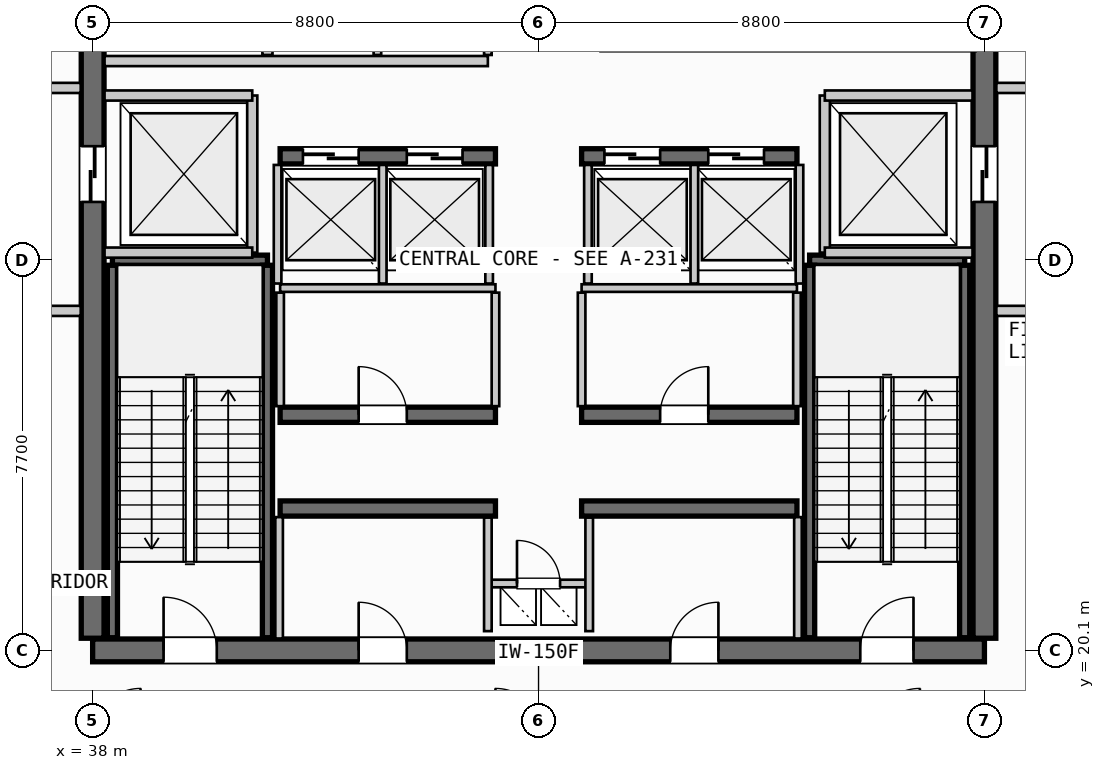
"""IFC4 building model, lengths in metres.
Left out: names, types, materials, properties, quantities, classifications, styles, units other than length and angle.
Written with IfcOpenShell. Run it as: python <this file> out.ifc"""

import sys

from ifc_helpers import new_model, si_unit, direction, frame, frame_2d, origin, place, context, subcontext, project, spatial, rectangle, extrude, source, transform, mapped, element, fill, save


model = new_model("IFC4")
c1 = context("Model", 3, precision=1e-05, world=origin(), true_north=direction((0.0, 1.0)))
c2 = subcontext(c1, "Body", "Model", "MODEL_VIEW")
j1 = project(units=[si_unit("LENGTHUNIT", "METRE"), si_unit("PLANEANGLEUNIT", "RADIAN")], contexts=[c1])
p1 = place(None, origin())
s1 = spatial("IfcSite", under=j1, at=p1, CompositionType="ELEMENT")
p2 = place(p1, origin())
s2 = spatial("IfcBuilding", under=s1, at=p2, CompositionType="ELEMENT")
p3 = place(p2, frame((0.0, 0.0, 223.6)))
s3 = spatial("IfcBuildingStorey", under=s2, at=p3, CompositionType="ELEMENT", Elevation=223.6)
p4 = place(p3, frame((38.0, 20.1, 0.0), z_axis=(0.0, 0.0, 1.0), x_axis=(1.0, 0.0, 0.0)))
e1 = element("IfcWall", 1, at=p4, inside=s3, PredefinedType="SHEAR", context=c2, shape_type="SweptSolid", body=[
    extrude(rectangle(XDim=17.6, YDim=0.45, at=frame_2d((8.8, 0.0))), origin(), (0.0, 0.0, 1.0), 4.38),
])
p5 = place(p4, frame((1.4, 0.0, 0.0)))
e2 = element("IfcOpeningElement", 2, at=p5, cuts=e1, PredefinedType="OPENING", context=c2, shape_type="SweptSolid", body=[
    extrude(rectangle(XDim=1.05, YDim=2.15, at=frame_2d((0.525, 1.075))), frame((0.0, 0.235, 0.0), z_axis=(0.0, -1.0, 0.0), x_axis=(1.0, 0.0, 0.0)), (0.0, 0.0, 1.0), 0.47),
])
p6 = place(p4, frame((15.15, 0.0, 0.0)))
e3 = element("IfcOpeningElement", 3, at=p6, cuts=e1, PredefinedType="OPENING", context=c2, shape_type="SweptSolid", body=[
    extrude(rectangle(XDim=1.05, YDim=2.15, at=frame_2d((0.525, 1.075))), frame((0.0, 0.235, 0.0), z_axis=(0.0, -1.0, 0.0), x_axis=(1.0, 0.0, 0.0)), (0.0, 0.0, 1.0), 0.47),
])
p7 = place(p4, frame((5.25, 0.0, 0.0)))
e4 = element("IfcOpeningElement", 4, at=p7, cuts=e1, PredefinedType="OPENING", context=c2, shape_type="SweptSolid", body=[
    extrude(rectangle(XDim=0.95, YDim=2.15, at=frame_2d((0.475, 1.075))), frame((0.0, 0.235, 0.0), z_axis=(0.0, -1.0, 0.0), x_axis=(1.0, 0.0, 0.0)), (0.0, 0.0, 1.0), 0.47),
])
p8 = place(p4, frame((11.4, 0.0, 0.0)))
e5 = element("IfcOpeningElement", 5, at=p8, cuts=e1, PredefinedType="OPENING", context=c2, shape_type="SweptSolid", body=[
    extrude(rectangle(XDim=0.95, YDim=2.15, at=frame_2d((0.475, 1.075))), frame((0.0, 0.235, 0.0), z_axis=(0.0, -1.0, 0.0), x_axis=(1.0, 0.0, 0.0)), (0.0, 0.0, 1.0), 0.47),
])
p9 = place(p3, frame((38.0, 35.26, 0.0), z_axis=(0.0, 0.0, 1.0), x_axis=(0.0, -1.0, 0.0)))
e6 = element("IfcWall", 6, at=p9, inside=s3, PredefinedType="SHEAR", context=c2, shape_type="SweptSolid", body=[
    extrude(rectangle(XDim=14.92, YDim=0.45, at=frame_2d((7.46, 0.0))), origin(), (0.0, 0.0, 1.0), 4.38),
])
p10 = place(p9, frame((5.21, 0.0, 0.0)))
e7 = element("IfcOpeningElement", 7, at=p10, cuts=e6, PredefinedType="OPENING", context=c2, shape_type="SweptSolid", body=[
    extrude(rectangle(XDim=1.1, YDim=2.2, at=frame_2d((0.55, 1.1))), frame((0.0, 0.235, 0.0), z_axis=(0.0, -1.0, 0.0), x_axis=(1.0, 0.0, 0.0)), (0.0, 0.0, 1.0), 0.47),
])
p11 = place(p3, frame((55.6, 20.34, 0.0), z_axis=(0.0, 0.0, 1.0), x_axis=(0.0, 1.0, 0.0)))
e8 = element("IfcWall", 8, at=p11, inside=s3, PredefinedType="SHEAR", context=c2, shape_type="SweptSolid", body=[
    extrude(rectangle(XDim=14.92, YDim=0.45, at=frame_2d((7.46, 0.0))), origin(), (0.0, 0.0, 1.0), 4.38),
])
p12 = place(p11, frame((12.71, 0.0, 0.0)))
e9 = element("IfcOpeningElement", 9, at=p12, cuts=e8, PredefinedType="OPENING", context=c2, shape_type="SweptSolid", body=[
    extrude(rectangle(XDim=1.05, YDim=2.15, at=frame_2d((0.525, 1.075))), frame((0.0, 0.235, 0.0), z_axis=(0.0, -1.0, 0.0), x_axis=(1.0, 0.0, 0.0)), (0.0, 0.0, 1.0), 0.47),
])
p13 = place(p11, frame((8.61, 0.0, 0.0)))
e10 = element("IfcOpeningElement", 10, at=p13, cuts=e8, PredefinedType="OPENING", context=c2, shape_type="SweptSolid", body=[
    extrude(rectangle(XDim=1.1, YDim=2.2, at=frame_2d((0.55, 1.1))), frame((0.0, 0.235, 0.0), z_axis=(0.0, -1.0, 0.0), x_axis=(1.0, 0.0, 0.0)), (0.0, 0.0, 1.0), 0.47),
])
for number, where, z_axis, x_axis in (
    (11, (41.7, 22.9, 0.0), (0.0, 0.0, 1.0), (1.0, 0.0, 0.0)),
    (12, (47.65, 22.9, 0.0), (0.0, 0.0, 1.0), (1.0, 0.0, 0.0)),
):
    element("IfcWall", number, at=place(p3, frame(where, z_axis=z_axis, x_axis=x_axis)), inside=s3, PredefinedType="SHEAR", context=c2, shape_type="SweptSolid", body=[
        extrude(rectangle(XDim=4.25, YDim=0.3, at=frame_2d((2.125, 0.0))), origin(), (0.0, 0.0, 1.0), 4.38),
    ])
p14 = place(p3, frame((41.7, 24.75, 0.0), z_axis=(0.0, 0.0, 1.0), x_axis=(1.0, 0.0, 0.0)))
e13 = element("IfcWall", 13, at=p14, inside=s3, PredefinedType="SHEAR", context=c2, shape_type="SweptSolid", body=[
    extrude(rectangle(XDim=4.25, YDim=0.3, at=frame_2d((2.125, 0.0))), origin(), (0.0, 0.0, 1.0), 4.38),
])
p15 = place(p14, frame((1.55, 0.0, 0.0)))
e14 = element("IfcOpeningElement", 14, at=p15, cuts=e13, PredefinedType="OPENING", context=c2, shape_type="SweptSolid", body=[
    extrude(rectangle(XDim=0.95, YDim=2.15, at=frame_2d((0.475, 1.075))), frame((0.0, 0.16, 0.0), z_axis=(0.0, -1.0, 0.0), x_axis=(1.0, 0.0, 0.0)), (0.0, 0.0, 1.0), 0.32),
])
p16 = place(p3, frame((47.65, 24.75, 0.0), z_axis=(0.0, 0.0, 1.0), x_axis=(1.0, 0.0, 0.0)))
e15 = element("IfcWall", 15, at=p16, inside=s3, PredefinedType="SHEAR", context=c2, shape_type="SweptSolid", body=[
    extrude(rectangle(XDim=4.25, YDim=0.3, at=frame_2d((2.125, 0.0))), origin(), (0.0, 0.0, 1.0), 4.38),
])
p17 = place(p16, frame((1.55, 0.0, 0.0)))
e16 = element("IfcOpeningElement", 16, at=p17, cuts=e15, PredefinedType="OPENING", context=c2, shape_type="SweptSolid", body=[
    extrude(rectangle(XDim=0.95, YDim=2.15, at=frame_2d((0.475, 1.075))), frame((0.0, 0.16, 0.0), z_axis=(0.0, -1.0, 0.0), x_axis=(1.0, 0.0, 0.0)), (0.0, 0.0, 1.0), 0.32),
])
p18 = place(p3, frame((41.7, 29.85, 0.0), z_axis=(0.0, 0.0, 1.0), x_axis=(1.0, 0.0, 0.0)))
e17 = element("IfcWall", 17, at=p18, inside=s3, PredefinedType="SHEAR", context=c2, shape_type="SweptSolid", body=[
    extrude(rectangle(XDim=4.25, YDim=0.3, at=frame_2d((2.125, 0.0))), origin(), (0.0, 0.0, 1.0), 4.38),
])
p19 = place(p18, frame((0.45, 0.0, 0.0)))
e18 = element("IfcOpeningElement", 18, at=p19, cuts=e17, PredefinedType="OPENING", context=c2, shape_type="SweptSolid", body=[
    extrude(rectangle(XDim=1.1, YDim=2.2, at=frame_2d((0.55, 1.1))), frame((0.0, 0.16, 0.0), z_axis=(0.0, -1.0, 0.0), x_axis=(1.0, 0.0, 0.0)), (0.0, 0.0, 1.0), 0.32),
])
p20 = place(p18, frame((2.5, 0.0, 0.0)))
e19 = element("IfcOpeningElement", 19, at=p20, cuts=e17, PredefinedType="OPENING", context=c2, shape_type="SweptSolid", body=[
    extrude(rectangle(XDim=1.1, YDim=2.2, at=frame_2d((0.55, 1.1))), frame((0.0, 0.16, 0.0), z_axis=(0.0, -1.0, 0.0), x_axis=(1.0, 0.0, 0.0)), (0.0, 0.0, 1.0), 0.32),
])
p21 = place(p3, frame((47.65, 29.85, 0.0), z_axis=(0.0, 0.0, 1.0), x_axis=(1.0, 0.0, 0.0)))
e20 = element("IfcWall", 20, at=p21, inside=s3, PredefinedType="SHEAR", context=c2, shape_type="SweptSolid", body=[
    extrude(rectangle(XDim=4.25, YDim=0.3, at=frame_2d((2.125, 0.0))), origin(), (0.0, 0.0, 1.0), 4.38),
])
p22 = place(p21, frame((0.45, 0.0, 0.0)))
e21 = element("IfcOpeningElement", 21, at=p22, cuts=e20, PredefinedType="OPENING", context=c2, shape_type="SweptSolid", body=[
    extrude(rectangle(XDim=1.1, YDim=2.2, at=frame_2d((0.55, 1.1))), frame((0.0, 0.16, 0.0), z_axis=(0.0, -1.0, 0.0), x_axis=(1.0, 0.0, 0.0)), (0.0, 0.0, 1.0), 0.32),
])
p23 = place(p21, frame((2.5, 0.0, 0.0)))
e22 = element("IfcOpeningElement", 22, at=p23, cuts=e20, PredefinedType="OPENING", context=c2, shape_type="SweptSolid", body=[
    extrude(rectangle(XDim=1.1, YDim=2.2, at=frame_2d((0.55, 1.1))), frame((0.0, 0.16, 0.0), z_axis=(0.0, -1.0, 0.0), x_axis=(1.0, 0.0, 0.0)), (0.0, 0.0, 1.0), 0.32),
])
p24 = place(p3, frame((38.39, 27.8, 0.0), z_axis=(0.0, 0.0, 1.0), x_axis=(1.0, 0.0, 0.0)))
e23 = element("IfcWall", 23, at=p24, inside=s3, PredefinedType="SHEAR", context=c2, shape_type="SweptSolid", body=[
    extrude(rectangle(XDim=3.06, YDim=0.2, at=frame_2d((1.53, 0.0))), origin(), (0.0, 0.0, 1.0), 4.38),
])
for number, where, z_axis, x_axis in (
    (24, (41.45, 27.7, 0.0), (0.0, 0.0, 1.0), (0.0, -1.0, 0.0)),
    (25, (38.39, 20.35, 0.0), (0.0, 0.0, 1.0), (0.0, 1.0, 0.0)),
):
    element("IfcWall", number, at=place(p3, frame(where, z_axis=z_axis, x_axis=x_axis)), inside=s3, PredefinedType="SHEAR", context=c2, shape_type="SweptSolid", body=[
        extrude(rectangle(XDim=7.35, YDim=0.2, at=frame_2d((3.675, 0.0))), origin(), (0.0, 0.0, 1.0), 4.38),
    ])
p25 = place(p3, frame((52.15, 27.8, 0.0), z_axis=(0.0, 0.0, 1.0), x_axis=(1.0, 0.0, 0.0)))
e26 = element("IfcWall", 26, at=p25, inside=s3, PredefinedType="SHEAR", context=c2, shape_type="SweptSolid", body=[
    extrude(rectangle(XDim=3.06, YDim=0.2, at=frame_2d((1.53, 0.0))), origin(), (0.0, 0.0, 1.0), 4.38),
])
for number, where, z_axis, x_axis in (
    (27, (55.21, 27.7, 0.0), (0.0, 0.0, 1.0), (0.0, -1.0, 0.0)),
    (28, (52.15, 20.35, 0.0), (0.0, 0.0, 1.0), (0.0, 1.0, 0.0)),
):
    element("IfcWall", number, at=place(p3, frame(where, z_axis=z_axis, x_axis=x_axis)), inside=s3, PredefinedType="SHEAR", context=c2, shape_type="SweptSolid", body=[
        extrude(rectangle(XDim=7.35, YDim=0.2, at=frame_2d((3.675, 0.0))), origin(), (0.0, 0.0, 1.0), 4.38),
    ])
p26 = place(p3, frame((45.8, 21.42, 0.0), z_axis=(0.0, 0.0, 1.0), x_axis=(1.0, 0.0, 0.0)))
e29 = element("IfcWall", 29, at=p26, inside=s3, PredefinedType="PARTITIONING", context=c2, shape_type="SweptSolid", body=[
    extrude(rectangle(XDim=2.0, YDim=0.15, at=frame_2d((1.0, 0.0))), origin(), (0.0, 0.0, 1.0), 2.455),
])
p27 = place(p26, frame((0.575, 0.0, 0.0)))
e30 = element("IfcOpeningElement", 30, at=p27, cuts=e29, PredefinedType="OPENING", context=c2, shape_type="SweptSolid", body=[
    extrude(rectangle(XDim=0.85, YDim=2.15, at=frame_2d((0.425, 1.075))), frame((0.0, 0.085, 0.0), z_axis=(0.0, -1.0, 0.0), x_axis=(1.0, 0.0, 0.0)), (0.0, 0.0, 1.0), 0.17),
])
for number, where, z_axis, x_axis in (
    (31, (45.8, 20.48, 0.0), (0.0, 0.0, 1.0), (0.0, 1.0, 0.0)),
    (32, (47.8, 20.48, 0.0), (0.0, 0.0, 1.0), (0.0, 1.0, 0.0)),
):
    element("IfcWall", number, at=place(p3, frame(where, z_axis=z_axis, x_axis=x_axis)), inside=s3, PredefinedType="PARTITIONING", context=c2, shape_type="SweptSolid", body=[
        extrude(rectangle(XDim=2.24, YDim=0.15, at=frame_2d((1.12, 0.0))), origin(), (0.0, 0.0, 1.0), 2.455),
    ])
p28 = place(p3, frame((41.15, 27.95, 0.0), z_axis=(0.0, 0.0, 1.0), x_axis=(0.0, 1.0, 0.0)))
e33 = element("IfcWall", 33, at=p28, inside=s3, PredefinedType="PARTITIONING", context=c2, shape_type="SweptSolid", body=[
    extrude(rectangle(XDim=3.1, YDim=0.2, at=frame_2d((1.55, 0.0))), origin(), (0.0, 0.0, 1.0), 2.455),
])
for number, where, z_axis, x_axis in (
    (34, (38.235, 27.95, 0.0), (0.0, 0.0, 1.0), (1.0, 0.0, 0.0)),
    (35, (38.235, 31.05, 0.0), (0.0, 0.0, 1.0), (1.0, 0.0, 0.0)),
):
    element("IfcWall", number, at=place(p3, frame(where, z_axis=z_axis, x_axis=x_axis)), inside=s3, PredefinedType="PARTITIONING", context=c2, shape_type="SweptSolid", body=[
        extrude(rectangle(XDim=2.915, YDim=0.2, at=frame_2d((1.458, 0.0))), origin(), (0.0, 0.0, 1.0), 2.455),
    ])
for number, where, z_axis, x_axis in (
    (36, (34.5, 26.8, 0.0), (0.0, 0.0, 1.0), (1.0, 0.0, 0.0)),
    (37, (34.5, 31.2, 0.0), (0.0, 0.0, 1.0), (1.0, 0.0, 0.0)),
):
    element("IfcWall", number, at=place(p3, frame(where, z_axis=z_axis, x_axis=x_axis)), inside=s3, PredefinedType="PARTITIONING", context=c2, shape_type="SweptSolid", body=[
        extrude(rectangle(XDim=3.265, YDim=0.2, at=frame_2d((1.632, 0.0))), origin(), (0.0, 0.0, 1.0), 2.455),
    ])
p29 = place(p3, frame((52.45, 27.95, 0.0), z_axis=(0.0, 0.0, 1.0), x_axis=(0.0, 1.0, 0.0)))
e38 = element("IfcWall", 38, at=p29, inside=s3, PredefinedType="PARTITIONING", context=c2, shape_type="SweptSolid", body=[
    extrude(rectangle(XDim=3.1, YDim=0.2, at=frame_2d((1.55, 0.0))), origin(), (0.0, 0.0, 1.0), 2.455),
])
for number, where, z_axis, x_axis in (
    (39, (52.45, 27.95, 0.0), (0.0, 0.0, 1.0), (1.0, 0.0, 0.0)),
    (40, (52.45, 31.05, 0.0), (0.0, 0.0, 1.0), (1.0, 0.0, 0.0)),
):
    element("IfcWall", number, at=place(p3, frame(where, z_axis=z_axis, x_axis=x_axis)), inside=s3, PredefinedType="PARTITIONING", context=c2, shape_type="SweptSolid", body=[
        extrude(rectangle(XDim=2.915, YDim=0.2, at=frame_2d((1.458, 0.0))), origin(), (0.0, 0.0, 1.0), 2.455),
    ])
for number, where, z_axis, x_axis in (
    (41, (55.835, 26.8, 0.0), (0.0, 0.0, 1.0), (1.0, 0.0, 0.0)),
    (42, (55.835, 31.2, 0.0), (0.0, 0.0, 1.0), (1.0, 0.0, 0.0)),
):
    element("IfcWall", number, at=place(p3, frame(where, z_axis=z_axis, x_axis=x_axis)), inside=s3, PredefinedType="PARTITIONING", context=c2, shape_type="SweptSolid", body=[
        extrude(rectangle(XDim=3.265, YDim=0.2, at=frame_2d((1.633, 0.0))), origin(), (0.0, 0.0, 1.0), 2.455),
    ])
for number, where, z_axis, x_axis in (
    (43, (41.68, 20.335, 0.0), (0.0, 0.0, 1.0), (0.0, 1.0, 0.0)),
    (44, (51.92, 20.335, 0.0), (0.0, 0.0, 1.0), (0.0, 1.0, 0.0)),
):
    element("IfcWall", number, at=place(p3, frame(where, z_axis=z_axis, x_axis=x_axis)), inside=s3, PredefinedType="PARTITIONING", context=c2, shape_type="SweptSolid", body=[
        extrude(rectangle(XDim=2.395, YDim=0.15, at=frame_2d((1.198, 0.0))), origin(), (0.0, 0.0, 1.0), 2.455),
    ])
for number, where, z_axis, x_axis in (
    (45, (41.7, 27.25, 0.0), (0.0, 0.0, 1.0), (1.0, 0.0, 0.0)),
    (46, (47.65, 27.25, 0.0), (0.0, 0.0, 1.0), (1.0, 0.0, 0.0)),
):
    element("IfcWall", number, at=place(p3, frame(where, z_axis=z_axis, x_axis=x_axis)), inside=s3, PredefinedType="PARTITIONING", context=c2, shape_type="SweptSolid", body=[
        extrude(rectangle(XDim=4.25, YDim=0.15, at=frame_2d((2.125, 0.0))), origin(), (0.0, 0.0, 1.0), 2.455),
    ])
for number, where, z_axis, x_axis in (
    (47, (41.7, 24.92, 0.0), (0.0, 0.0, 1.0), (0.0, 1.0, 0.0)),
    (48, (45.95, 24.92, 0.0), (0.0, 0.0, 1.0), (0.0, 1.0, 0.0)),
    (49, (47.65, 24.92, 0.0), (0.0, 0.0, 1.0), (0.0, 1.0, 0.0)),
    (50, (51.9, 24.92, 0.0), (0.0, 0.0, 1.0), (0.0, 1.0, 0.0)),
):
    element("IfcWall", number, at=place(p3, frame(where, z_axis=z_axis, x_axis=x_axis)), inside=s3, PredefinedType="PARTITIONING", context=c2, shape_type="SweptSolid", body=[
        extrude(rectangle(XDim=2.24, YDim=0.15, at=frame_2d((1.12, 0.0))), origin(), (0.0, 0.0, 1.0), 2.455),
    ])
for number, where, z_axis, x_axis in (
    (51, (41.65, 27.34, 0.0), (0.0, 0.0, 1.0), (0.0, 1.0, 0.0)),
    (52, (43.725, 27.34, 0.0), (0.0, 0.0, 1.0), (0.0, 1.0, 0.0)),
    (53, (45.825, 27.34, 0.0), (0.0, 0.0, 1.0), (0.0, 1.0, 0.0)),
    (54, (47.775, 27.34, 0.0), (0.0, 0.0, 1.0), (0.0, 1.0, 0.0)),
    (55, (49.875, 27.34, 0.0), (0.0, 0.0, 1.0), (0.0, 1.0, 0.0)),
    (56, (51.95, 27.34, 0.0), (0.0, 0.0, 1.0), (0.0, 1.0, 0.0)),
):
    element("IfcWall", number, at=place(p3, frame(where, z_axis=z_axis, x_axis=x_axis)), inside=s3, PredefinedType="PARTITIONING", context=c2, shape_type="SweptSolid", body=[
        extrude(rectangle(XDim=2.34, YDim=0.15, at=frame_2d((1.17, 0.0))), origin(), (0.0, 0.0, 1.0), 2.455),
    ])
p30 = place(p3, frame((41.45, 31.85, 0.0), z_axis=(0.0, 0.0, 1.0), x_axis=(0.0, 1.0, 0.0)))
e57 = element("IfcWall", 57, at=p30, inside=s3, PredefinedType="PARTITIONING", context=c2, shape_type="SweptSolid", body=[
    extrude(rectangle(XDim=3.415, YDim=0.2, at=frame_2d((1.708, 0.0))), origin(), (0.0, 0.0, 1.0), 2.455),
])
p31 = place(p3, frame((38.235, 31.73, 0.0), z_axis=(0.0, 0.0, 1.0), x_axis=(1.0, 0.0, 0.0)))
e58 = element("IfcWall", 58, at=p31, inside=s3, PredefinedType="PARTITIONING", context=c2, shape_type="SweptSolid", body=[
    extrude(rectangle(XDim=7.565, YDim=0.2, at=frame_2d((3.782, 0.0))), origin(), (0.0, 0.0, 1.0), 2.455),
])
p32 = place(p3, frame((45.8, 31.85, 0.0), z_axis=(0.0, 0.0, 1.0), x_axis=(0.0, 1.0, 0.0)))
e59 = element("IfcWall", 59, at=p32, inside=s3, PredefinedType="PARTITIONING", context=c2, shape_type="SweptSolid", body=[
    extrude(rectangle(XDim=3.415, YDim=0.15, at=frame_2d((1.708, 0.0))), origin(), (0.0, 0.0, 1.0), 2.455),
])
p33 = place(p3, frame((43.62, 31.85, 0.0), z_axis=(0.0, 0.0, 1.0), x_axis=(0.0, 1.0, 0.0)))
e60 = element("IfcWall", 60, at=p33, inside=s3, PredefinedType="PLUMBINGWALL", context=c2, shape_type="SweptSolid", body=[
    extrude(rectangle(XDim=3.415, YDim=0.15, at=frame_2d((1.708, 0.0))), origin(), (0.0, 0.0, 1.0), 2.455),
])
m1 = source(origin(), c2, "Body", "SweptSolid", [
    extrude(rectangle(XDim=1.05, YDim=2.15, at=frame_2d((0.525, 1.075))), frame((0.0, 0.025, 0.0), z_axis=(0.0, -1.0, 0.0), x_axis=(1.0, 0.0, 0.0)), (0.0, 0.0, 1.0), 0.05),
])
p34 = place(p5, origin())
e61 = element("IfcDoor", 61, at=p34, inside=s3, OperationType="SINGLE_SWING_LEFT", PredefinedType="DOOR", context=c2, shape_type="MappedRepresentation", body=[
    mapped(m1, transform((0.0, 0.0, 0.0), scale=1.0)),
])
fill(e2, e61)
p35 = place(p6, origin())
e62 = element("IfcDoor", 62, at=p35, inside=s3, OperationType="SINGLE_SWING_RIGHT", PredefinedType="DOOR", context=c2, shape_type="MappedRepresentation", body=[
    mapped(m1, transform((0.0, 0.0, 0.0), scale=1.0)),
])
fill(e3, e62)
m2 = source(origin(), c2, "Body", "SweptSolid", [
    extrude(rectangle(XDim=1.1, YDim=2.2, at=frame_2d((0.55, 1.1))), frame((0.0, 0.025, 0.0), z_axis=(0.0, -1.0, 0.0), x_axis=(1.0, 0.0, 0.0)), (0.0, 0.0, 1.0), 0.05),
])
p36 = place(p10, origin())
e63 = element("IfcDoor", 63, at=p36, inside=s3, OperationType="SLIDING_TO_LEFT", PredefinedType="DOOR", context=c2, shape_type="MappedRepresentation", body=[
    mapped(m2, transform((0.0, 0.0, 0.0), scale=1.0)),
])
fill(e7, e63)
p37 = place(p13, origin())
e64 = element("IfcDoor", 64, at=p37, inside=s3, OperationType="SLIDING_TO_RIGHT", PredefinedType="DOOR", context=c2, shape_type="MappedRepresentation", body=[
    mapped(m2, transform((0.0, 0.0, 0.0), scale=1.0)),
])
fill(e10, e64)
m3 = source(origin(), c2, "Body", "SweptSolid", [
    extrude(rectangle(XDim=0.95, YDim=2.15, at=frame_2d((0.475, 1.075))), frame((0.0, 0.025, 0.0), z_axis=(0.0, -1.0, 0.0), x_axis=(1.0, 0.0, 0.0)), (0.0, 0.0, 1.0), 0.05),
])
p38 = place(p7, origin())
e65 = element("IfcDoor", 65, at=p38, inside=s3, OperationType="SINGLE_SWING_LEFT", PredefinedType="DOOR", context=c2, shape_type="MappedRepresentation", body=[
    mapped(m3, transform((0.0, 0.0, 0.0), scale=1.0)),
])
fill(e4, e65)
p39 = place(p8, origin())
e66 = element("IfcDoor", 66, at=p39, inside=s3, OperationType="SINGLE_SWING_RIGHT", PredefinedType="DOOR", context=c2, shape_type="MappedRepresentation", body=[
    mapped(m3, transform((0.0, 0.0, 0.0), scale=1.0)),
])
fill(e5, e66)
p40 = place(p15, origin())
e67 = element("IfcDoor", 67, at=p40, inside=s3, OperationType="SINGLE_SWING_LEFT", PredefinedType="DOOR", context=c2, shape_type="MappedRepresentation", body=[
    mapped(m3, transform((0.0, 0.0, 0.0), scale=1.0)),
])
fill(e14, e67)
p41 = place(p17, origin())
e68 = element("IfcDoor", 68, at=p41, inside=s3, OperationType="SINGLE_SWING_RIGHT", PredefinedType="DOOR", context=c2, shape_type="MappedRepresentation", body=[
    mapped(m3, transform((0.0, 0.0, 0.0), scale=1.0)),
])
fill(e16, e68)
p42 = place(p19, origin())
e69 = element("IfcDoor", 69, at=p42, inside=s3, OperationType="SLIDING_TO_LEFT", PredefinedType="DOOR", context=c2, shape_type="MappedRepresentation", body=[
    mapped(m2, transform((0.0, 0.0, 0.0), scale=1.0)),
])
fill(e18, e69)
p43 = place(p20, origin())
e70 = element("IfcDoor", 70, at=p43, inside=s3, OperationType="SLIDING_TO_LEFT", PredefinedType="DOOR", context=c2, shape_type="MappedRepresentation", body=[
    mapped(m2, transform((0.0, 0.0, 0.0), scale=1.0)),
])
fill(e19, e70)
p44 = place(p22, origin())
e71 = element("IfcDoor", 71, at=p44, inside=s3, OperationType="SLIDING_TO_LEFT", PredefinedType="DOOR", context=c2, shape_type="MappedRepresentation", body=[
    mapped(m2, transform((0.0, 0.0, 0.0), scale=1.0)),
])
fill(e21, e71)
p45 = place(p23, origin())
e72 = element("IfcDoor", 72, at=p45, inside=s3, OperationType="SLIDING_TO_LEFT", PredefinedType="DOOR", context=c2, shape_type="MappedRepresentation", body=[
    mapped(m2, transform((0.0, 0.0, 0.0), scale=1.0)),
])
fill(e22, e72)
m4 = source(origin(), c2, "Body", "SweptSolid", [
    extrude(rectangle(XDim=0.85, YDim=2.15, at=frame_2d((0.425, 1.075))), frame((0.0, 0.025, 0.0), z_axis=(0.0, -1.0, 0.0), x_axis=(1.0, 0.0, 0.0)), (0.0, 0.0, 1.0), 0.05),
])
p46 = place(p27, origin())
e73 = element("IfcDoor", 73, at=p46, inside=s3, OperationType="SINGLE_SWING_LEFT", PredefinedType="DOOR", context=c2, shape_type="MappedRepresentation", body=[
    mapped(m4, transform((0.0, 0.0, 0.0), scale=1.0)),
])
fill(e30, e73)
save(model, sys.argv[1])
